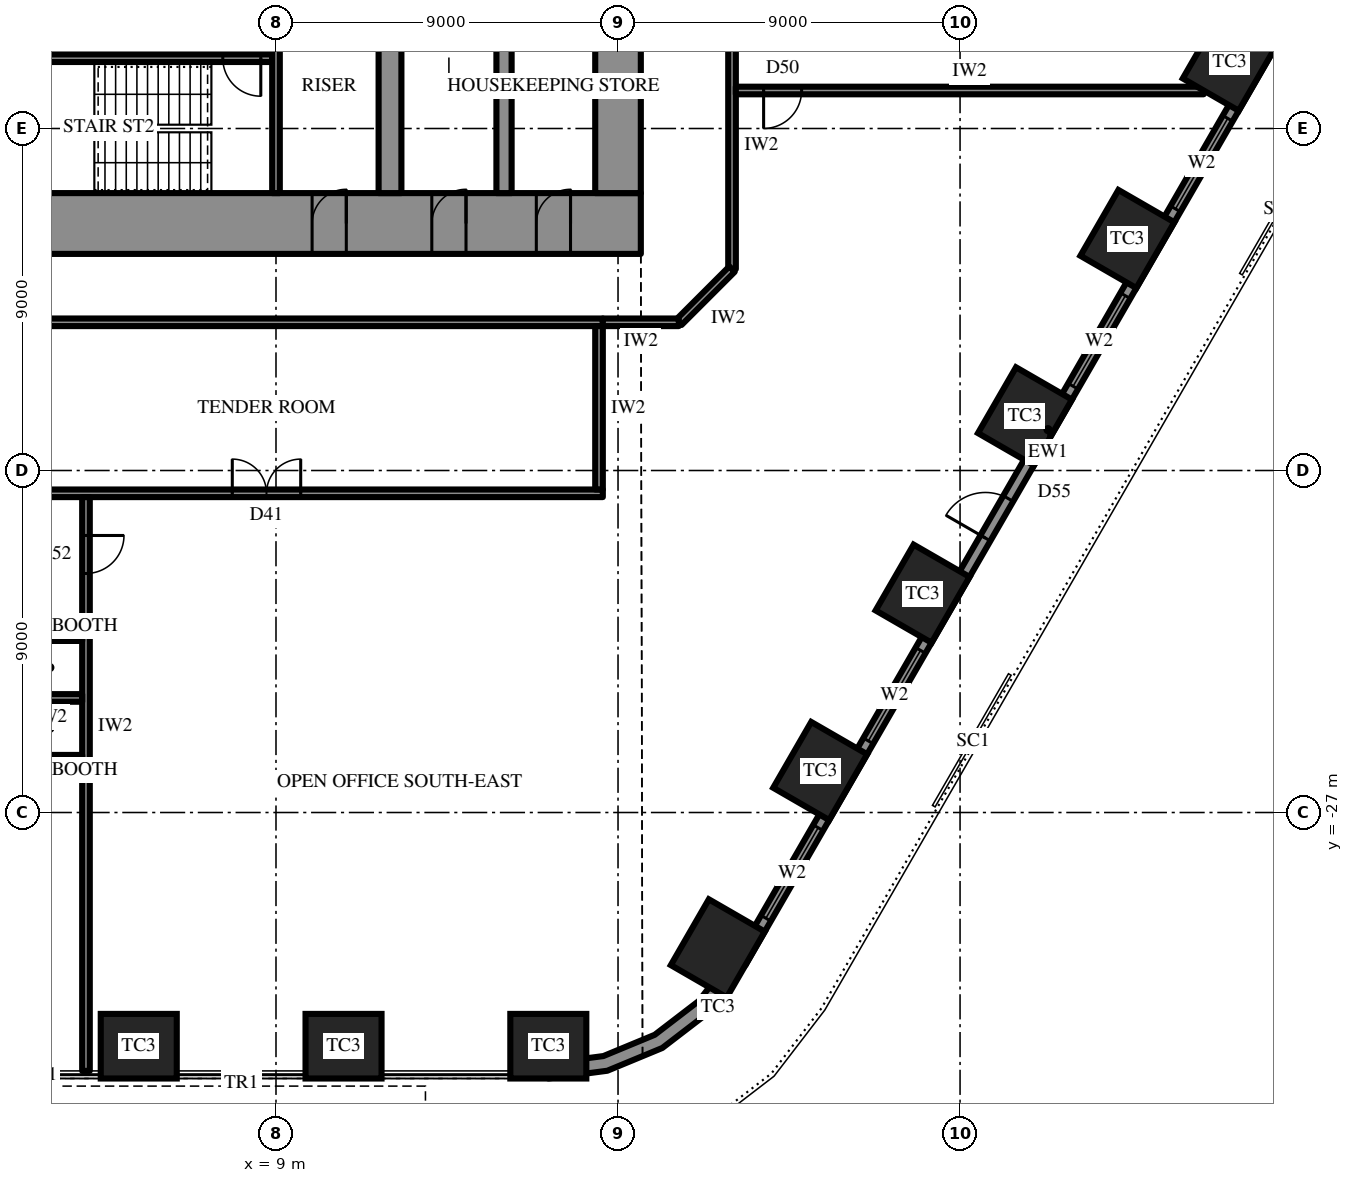
"""IFC4 building model, lengths in metres.
Left out: names, types, materials, properties, quantities, classifications, styles, units other than length and angle.
Written with IfcOpenShell. Run it as: python <this file> out.ifc"""

import sys

from ifc_helpers import new_model, si_unit, direction, frame, frame_2d, origin, origin_2d, place, context, subcontext, project, spatial, polyline, rectangle, outline, extrude, element, fill, save


model = new_model("IFC4")
c1 = context("Model", 3, precision=1e-05, world=origin(), true_north=direction((0.0, 1.0)))
c2 = subcontext(c1, "Body", "Model", "MODEL_VIEW")
j1 = project(units=[si_unit("LENGTHUNIT", "METRE"), si_unit("PLANEANGLEUNIT", "RADIAN")], contexts=[c1])
p1 = place(None, origin())
s1 = spatial("IfcSite", under=j1, at=p1, CompositionType="ELEMENT")
p2 = place(p1, origin())
s2 = spatial("IfcBuilding", under=s1, at=p2, CompositionType="ELEMENT")
p3 = place(p2, frame((0.0, 0.0, 69.7)))
s3 = spatial("IfcBuildingStorey", under=s2, at=p3, CompositionType="ELEMENT", Elevation=69.7)
for number, where, z_axis, x_axis in (
    (1, (5.389, -33.15, 0.0), (0.0, 0.0, 1.0), (1.0, 0.0, 0.0)),
    (2, (10.777, -33.15, 0.0), (0.0, 0.0, 1.0), (1.0, 0.0, 0.0)),
    (3, (16.166, -33.15, 0.0), (0.0, 0.0, 1.0), (1.0, 0.0, 0.0)),
    (4, (20.626, -30.575, 0.0), (0.0, 0.0, 1.0), (0.5, 0.866, 0.0)),
    (5, (23.32, -25.908, 0.0), (0.0, 0.0, 1.0), (0.5, 0.866, 0.0)),
    (6, (26.014, -21.242, 0.0), (0.0, 0.0, 1.0), (0.5, 0.866, 0.0)),
    (7, (28.709, -16.575, 0.0), (0.0, 0.0, 1.0), (0.5, 0.866, 0.0)),
    (8, (31.403, -11.908, 0.0), (0.0, 0.0, 1.0), (0.5, 0.866, 0.0)),
    (9, (34.097, -7.242, 0.0), (0.0, 0.0, 1.0), (0.5, 0.866, 0.0)),
):
    element("IfcColumn", number, at=place(p3, frame(where, z_axis=z_axis, x_axis=x_axis)), inside=s3, PredefinedType="COLUMN", context=c2, shape_type="SweptSolid", body=[
        extrude(rectangle(XDim=2.0, YDim=1.7, at=origin_2d()), origin(), (0.0, 0.0, 1.0), 4.2),
    ])
p4 = place(p3, frame((18.6, -11.5, 0.0), z_axis=(0.0, 0.0, 1.0), x_axis=(-1.0, 0.0, 0.0)))
e10 = element("IfcWall", 10, at=p4, inside=s3, PredefinedType="SHEAR", context=c2, shape_type="SweptSolid", body=[
    extrude(rectangle(XDim=37.2, YDim=1.6, at=frame_2d((18.6, 0.0))), origin(), (0.0, 0.0, 1.0), 4.2),
])
p5 = place(p4, frame((19.45, 0.0, 0.0)))
e11 = element("IfcOpeningElement", 11, at=p5, cuts=e10, PredefinedType="OPENING", context=c2, shape_type="SweptSolid", body=[
    extrude(rectangle(XDim=0.9, YDim=2.2, at=frame_2d((0.45, 1.1))), frame((0.0, 0.81, 0.0), z_axis=(0.0, -1.0, 0.0), x_axis=(1.0, 0.0, 0.0)), (0.0, 0.0, 1.0), 1.62),
])
p6 = place(p4, frame((22.45, 0.0, 0.0)))
e12 = element("IfcOpeningElement", 12, at=p6, cuts=e10, PredefinedType="OPENING", context=c2, shape_type="SweptSolid", body=[
    extrude(rectangle(XDim=0.9, YDim=2.2, at=frame_2d((0.45, 1.1))), frame((0.0, 0.81, 0.0), z_axis=(0.0, -1.0, 0.0), x_axis=(1.0, 0.0, 0.0)), (0.0, 0.0, 1.0), 1.62),
])
p7 = place(p4, frame((25.5, 0.0, 0.0)))
e13 = element("IfcOpeningElement", 13, at=p7, cuts=e10, PredefinedType="OPENING", context=c2, shape_type="SweptSolid", body=[
    extrude(rectangle(XDim=1.0, YDim=2.2, at=frame_2d((0.5, 1.1))), frame((0.0, 0.81, 0.0), z_axis=(0.0, -1.0, 0.0), x_axis=(1.0, 0.0, 0.0)), (0.0, 0.0, 1.0), 1.62),
])
p8 = place(p4, frame((1.85, 0.0, 0.0)))
e14 = element("IfcOpeningElement", 14, at=p8, cuts=e10, PredefinedType="OPENING", context=c2, shape_type="SweptSolid", body=[
    extrude(rectangle(XDim=0.9, YDim=2.2, at=frame_2d((0.45, 1.1))), frame((0.0, 0.81, 0.0), z_axis=(0.0, -1.0, 0.0), x_axis=(1.0, 0.0, 0.0)), (0.0, 0.0, 1.0), 1.62),
])
p9 = place(p4, frame((4.6, 0.0, 0.0)))
e15 = element("IfcOpeningElement", 15, at=p9, cuts=e10, PredefinedType="OPENING", context=c2, shape_type="SweptSolid", body=[
    extrude(rectangle(XDim=0.9, YDim=2.2, at=frame_2d((0.45, 1.1))), frame((0.0, 0.81, 0.0), z_axis=(0.0, -1.0, 0.0), x_axis=(1.0, 0.0, 0.0)), (0.0, 0.0, 1.0), 1.62),
])
p10 = place(p4, frame((7.75, 0.0, 0.0)))
e16 = element("IfcOpeningElement", 16, at=p10, cuts=e10, PredefinedType="OPENING", context=c2, shape_type="SweptSolid", body=[
    extrude(rectangle(XDim=0.9, YDim=2.2, at=frame_2d((0.45, 1.1))), frame((0.0, 0.81, 0.0), z_axis=(0.0, -1.0, 0.0), x_axis=(1.0, 0.0, 0.0)), (0.0, 0.0, 1.0), 1.62),
])
p11 = place(p4, frame((28.55, 0.0, 0.0)))
e17 = element("IfcOpeningElement", 17, at=p11, cuts=e10, PredefinedType="OPENING", context=c2, shape_type="SweptSolid", body=[
    extrude(rectangle(XDim=0.9, YDim=2.2, at=frame_2d((0.45, 1.1))), frame((0.0, 0.81, 0.0), z_axis=(0.0, -1.0, 0.0), x_axis=(1.0, 0.0, 0.0)), (0.0, 0.0, 1.0), 1.62),
])
p12 = place(p4, frame((31.7, 0.0, 0.0)))
e18 = element("IfcOpeningElement", 18, at=p12, cuts=e10, PredefinedType="OPENING", context=c2, shape_type="SweptSolid", body=[
    extrude(rectangle(XDim=0.9, YDim=2.2, at=frame_2d((0.45, 1.1))), frame((0.0, 0.81, 0.0), z_axis=(0.0, -1.0, 0.0), x_axis=(1.0, 0.0, 0.0)), (0.0, 0.0, 1.0), 1.62),
])
p13 = place(p4, frame((34.45, 0.0, 0.0)))
e19 = element("IfcOpeningElement", 19, at=p13, cuts=e10, PredefinedType="OPENING", context=c2, shape_type="SweptSolid", body=[
    extrude(rectangle(XDim=0.9, YDim=2.2, at=frame_2d((0.45, 1.1))), frame((0.0, 0.81, 0.0), z_axis=(0.0, -1.0, 0.0), x_axis=(1.0, 0.0, 0.0)), (0.0, 0.0, 1.0), 1.62),
])
p14 = place(p3, frame((18.0, -10.7, 0.0), z_axis=(0.0, 0.0, 1.0), x_axis=(0.0, 1.0, 0.0)))
e20 = element("IfcWall", 20, at=p14, inside=s3, PredefinedType="SHEAR", context=c2, shape_type="SweptSolid", body=[
    extrude(rectangle(XDim=21.4, YDim=1.2, at=frame_2d((10.7, 0.0))), origin(), (0.0, 0.0, 1.0), 4.2),
])
p15 = place(p14, frame((9.8, 0.0, 0.0)))
e21 = element("IfcOpeningElement", 21, at=p15, cuts=e20, PredefinedType="OPENING", context=c2, shape_type="SweptSolid", body=[
    extrude(rectangle(XDim=1.8, YDim=2.4, at=frame_2d((0.9, 1.2))), frame((0.0, 0.61, 0.0), z_axis=(0.0, -1.0, 0.0), x_axis=(1.0, 0.0, 0.0)), (0.0, 0.0, 1.0), 1.22),
])
p16 = place(p3, frame((12.0, -10.7, 0.0), z_axis=(0.0, 0.0, 1.0), x_axis=(0.0, 1.0, 0.0)))
e22 = element("IfcWall", 22, at=p16, inside=s3, PredefinedType="SHEAR", context=c2, shape_type="SweptSolid", body=[
    extrude(rectangle(XDim=21.4, YDim=0.6, at=frame_2d((10.7, 0.0))), origin(), (0.0, 0.0, 1.0), 4.2),
])
p17 = place(p16, frame((9.8, 0.0, 0.0)))
e23 = element("IfcOpeningElement", 23, at=p17, cuts=e22, PredefinedType="OPENING", context=c2, shape_type="SweptSolid", body=[
    extrude(rectangle(XDim=1.8, YDim=2.4, at=frame_2d((0.9, 1.2))), frame((0.0, 0.31, 0.0), z_axis=(0.0, -1.0, 0.0), x_axis=(1.0, 0.0, 0.0)), (0.0, 0.0, 1.0), 0.62),
])
p18 = place(p3, frame((15.0, -10.7, 0.0), z_axis=(0.0, 0.0, 1.0), x_axis=(0.0, 1.0, 0.0)))
e24 = element("IfcWall", 24, at=p18, inside=s3, PredefinedType="SHEAR", context=c2, shape_type="SweptSolid", body=[
    extrude(rectangle(XDim=21.4, YDim=0.4, at=frame_2d((10.7, 0.0))), origin(), (0.0, 0.0, 1.0), 4.2),
])
p19 = place(p18, frame((9.8, 0.0, 0.0)))
e25 = element("IfcOpeningElement", 25, at=p19, cuts=e24, PredefinedType="OPENING", context=c2, shape_type="SweptSolid", body=[
    extrude(rectangle(XDim=1.8, YDim=2.4, at=frame_2d((0.9, 1.2))), frame((0.0, 0.21, 0.0), z_axis=(0.0, -1.0, 0.0), x_axis=(1.0, 0.0, 0.0)), (0.0, 0.0, 1.0), 0.42),
])
p20 = place(p3, frame((8.9, -7.15, 0.0), z_axis=(0.0, 0.0, 1.0), x_axis=(-1.0, 0.0, 0.0)))
e26 = element("IfcWall", 26, at=p20, inside=s3, PredefinedType="SHEAR", context=c2, shape_type="SweptSolid", body=[
    extrude(rectangle(XDim=8.6, YDim=0.2, at=frame_2d((4.3, 0.0))), origin(), (0.0, 0.0, 1.0), 4.2),
])
p21 = place(p20, frame((0.3, 0.0, 0.0)))
e27 = element("IfcOpeningElement", 27, at=p21, cuts=e26, PredefinedType="OPENING", context=c2, shape_type="SweptSolid", body=[
    extrude(rectangle(XDim=1.0, YDim=2.2, at=frame_2d((0.5, 1.1))), frame((0.0, 0.11, 0.0), z_axis=(0.0, -1.0, 0.0), x_axis=(1.0, 0.0, 0.0)), (0.0, 0.0, 1.0), 0.22),
])
p22 = place(p3, origin())
e28 = element("IfcWall", 28, at=p22, inside=s3, PredefinedType="SOLIDWALL", context=c2, shape_type="SweptSolid", body=[
    extrude(outline(polyline([(16.166, -34.0), (17.719, -33.796), (19.166, -33.196), (20.408, -32.243), (21.362, -31.0), (21.016, -30.8), (20.125, -31.96), (18.966, -32.85), (17.615, -33.409), (16.166, -33.6), (16.166, -34.0)])), origin(), (0.0, 0.0, 1.0), 2.7),
])
p23 = place(p3, frame((21.232, -30.925, 0.0), z_axis=(0.0, 0.0, 1.0), x_axis=(0.499999163675, 0.866025886636, 0.0)))
e29 = element("IfcWall", 29, at=p23, inside=s3, PredefinedType="SOLIDWALL", context=c2, shape_type="SweptSolid", body=[
    extrude(rectangle(XDim=32.332, YDim=0.3, at=frame_2d((16.166, 0.0))), origin(), (0.0, 0.0, 1.0), 2.7),
])
p24 = place(p23, frame((1.319, 0.0, 0.6)))
e30 = element("IfcOpeningElement", 30, at=p24, cuts=e29, PredefinedType="OPENING", context=c2, shape_type="SweptSolid", body=[
    extrude(rectangle(XDim=2.75, YDim=1.85, at=frame_2d((1.375, 0.925))), frame((0.0, 0.16, 0.0), z_axis=(0.0, -1.0, 0.0), x_axis=(1.0, 0.0, 0.0)), (0.0, 0.0, 1.0), 0.32),
])
p25 = place(p23, frame((6.708, 0.0, 0.6)))
e31 = element("IfcOpeningElement", 31, at=p25, cuts=e29, PredefinedType="OPENING", context=c2, shape_type="SweptSolid", body=[
    extrude(rectangle(XDim=2.75, YDim=1.85, at=frame_2d((1.375, 0.925))), frame((0.0, 0.16, 0.0), z_axis=(0.0, -1.0, 0.0), x_axis=(1.0, 0.0, 0.0)), (0.0, 0.0, 1.0), 0.32),
])
p26 = place(p23, frame((12.872, 0.0, 0.0)))
e32 = element("IfcOpeningElement", 32, at=p26, cuts=e29, PredefinedType="OPENING", context=c2, shape_type="SweptSolid", body=[
    extrude(rectangle(XDim=1.2, YDim=2.4, at=frame_2d((0.6, 1.2))), frame((0.0, 0.16, 0.0), z_axis=(0.0, -1.0, 0.0), x_axis=(1.0, 0.0, 0.0)), (0.0, 0.0, 1.0), 0.32),
])
p27 = place(p23, frame((17.485, 0.0, 0.6)))
e33 = element("IfcOpeningElement", 33, at=p27, cuts=e29, PredefinedType="OPENING", context=c2, shape_type="SweptSolid", body=[
    extrude(rectangle(XDim=2.75, YDim=1.85, at=frame_2d((1.375, 0.925))), frame((0.0, 0.16, 0.0), z_axis=(0.0, -1.0, 0.0), x_axis=(1.0, 0.0, 0.0)), (0.0, 0.0, 1.0), 0.32),
])
p28 = place(p23, frame((22.874, 0.0, 0.6)))
e34 = element("IfcOpeningElement", 34, at=p28, cuts=e29, PredefinedType="OPENING", context=c2, shape_type="SweptSolid", body=[
    extrude(rectangle(XDim=2.75, YDim=1.85, at=frame_2d((1.375, 0.925))), frame((0.0, 0.16, 0.0), z_axis=(0.0, -1.0, 0.0), x_axis=(1.0, 0.0, 0.0)), (0.0, 0.0, 1.0), 0.32),
])
p29 = place(p23, frame((28.262, 0.0, 0.6)))
e35 = element("IfcOpeningElement", 35, at=p29, cuts=e29, PredefinedType="OPENING", context=c2, shape_type="SweptSolid", body=[
    extrude(rectangle(XDim=2.75, YDim=1.85, at=frame_2d((1.375, 0.925))), frame((0.0, 0.16, 0.0), z_axis=(0.0, -1.0, 0.0), x_axis=(1.0, 0.0, 0.0)), (0.0, 0.0, 1.0), 0.32),
])
p30 = place(p3, frame((9.0, -5.05, 0.0), z_axis=(0.0, 0.0, 1.0), x_axis=(0.0, -1.0, 0.0)))
e36 = element("IfcWall", 36, at=p30, inside=s3, PredefinedType="PARTITIONING", context=c2, shape_type="SweptSolid", body=[
    extrude(rectangle(XDim=5.65, YDim=0.2, at=frame_2d((2.825, 0.0))), origin(), (0.0, 0.0, 1.0), 4.0),
])
p31 = place(p3, frame((17.6, -14.1, 0.0), z_axis=(0.0, 0.0, 1.0), x_axis=(-1.0, 0.0, 0.0)))
e37 = element("IfcWall", 37, at=p31, inside=s3, PredefinedType="PARTITIONING", context=c2, shape_type="SweptSolid", body=[
    extrude(rectangle(XDim=35.2, YDim=0.2, at=frame_2d((17.6, 0.0))), origin(), (0.0, 0.0, 1.0), 4.0),
])
p32 = place(p3, frame((17.6, -18.6, 0.0), z_axis=(0.0, 0.0, 1.0), x_axis=(-1.0, 0.0, 0.0)))
e38 = element("IfcWall", 38, at=p32, inside=s3, PredefinedType="PARTITIONING", context=c2, shape_type="SweptSolid", body=[
    extrude(rectangle(XDim=35.2, YDim=0.2, at=frame_2d((17.6, 0.0))), origin(), (0.0, 0.0, 1.0), 4.0),
])
p33 = place(p32, frame((7.95, 0.0, 0.0)))
e39 = element("IfcOpeningElement", 39, at=p33, cuts=e38, PredefinedType="OPENING", context=c2, shape_type="SweptSolid", body=[
    extrude(rectangle(XDim=1.8, YDim=2.4, at=frame_2d((0.9, 1.2))), frame((0.0, 0.11, 0.0), z_axis=(0.0, -1.0, 0.0), x_axis=(1.0, 0.0, 0.0)), (0.0, 0.0, 1.0), 0.22),
])
p34 = place(p32, frame((25.45, 0.0, 0.0)))
e40 = element("IfcOpeningElement", 40, at=p34, cuts=e38, PredefinedType="OPENING", context=c2, shape_type="SweptSolid", body=[
    extrude(rectangle(XDim=1.8, YDim=2.4, at=frame_2d((0.9, 1.2))), frame((0.0, 0.11, 0.0), z_axis=(0.0, -1.0, 0.0), x_axis=(1.0, 0.0, 0.0)), (0.0, 0.0, 1.0), 0.22),
])
p35 = place(p3, frame((17.5, -14.2, 0.0), z_axis=(0.0, 0.0, 1.0), x_axis=(0.0, -1.0, 0.0)))
e41 = element("IfcWall", 41, at=p35, inside=s3, PredefinedType="PARTITIONING", context=c2, shape_type="SweptSolid", body=[
    extrude(rectangle(XDim=4.3, YDim=0.2, at=frame_2d((2.15, 0.0))), origin(), (0.0, 0.0, 1.0), 4.0),
])
p36 = place(p3, frame((21.0, -6.201, 0.0), z_axis=(0.0, 0.0, 1.0), x_axis=(0.0, -1.0, 0.0)))
e42 = element("IfcWall", 42, at=p36, inside=s3, PredefinedType="PARTITIONING", context=c2, shape_type="SweptSolid", body=[
    extrude(rectangle(XDim=6.499, YDim=0.2, at=frame_2d((3.25, 0.0))), origin(), (0.0, 0.0, 1.0), 4.0),
])
p37 = place(p3, frame((21.0, -12.7, 0.0), z_axis=(0.0, 0.0, 1.0), x_axis=(-0.707045124756, -0.707168432242, 0.0)))
e43 = element("IfcWall", 43, at=p37, inside=s3, PredefinedType="PARTITIONING", context=c2, shape_type="SweptSolid", body=[
    extrude(rectangle(XDim=1.98, YDim=0.2, at=frame_2d((0.99, 0.0))), origin(), (0.0, 0.0, 1.0), 4.0),
])
p38 = place(p3, frame((19.6, -14.1, 0.0), z_axis=(0.0, 0.0, 1.0), x_axis=(-1.0, 0.0, 0.0)))
e44 = element("IfcWall", 44, at=p38, inside=s3, PredefinedType="PARTITIONING", context=c2, shape_type="SweptSolid", body=[
    extrude(rectangle(XDim=2.0, YDim=0.2, at=frame_2d((1.0, 0.0))), origin(), (0.0, 0.0, 1.0), 4.0),
])
p39 = place(p3, frame((4.0, -18.7, 0.0), z_axis=(0.0, 0.0, 1.0), x_axis=(0.0, -1.0, 0.0)))
e45 = element("IfcWall", 45, at=p39, inside=s3, PredefinedType="PARTITIONING", context=c2, shape_type="SweptSolid", body=[
    extrude(rectangle(XDim=15.1, YDim=0.2, at=frame_2d((7.55, 0.0))), origin(), (0.0, 0.0, 1.0), 4.0),
])
p40 = place(p39, frame((1.01, 0.0, 0.0)))
e46 = element("IfcOpeningElement", 46, at=p40, cuts=e45, PredefinedType="OPENING", context=c2, shape_type="SweptSolid", body=[
    extrude(rectangle(XDim=1.0, YDim=2.2, at=frame_2d((0.5, 1.1))), frame((0.0, 0.11, 0.0), z_axis=(0.0, -1.0, 0.0), x_axis=(1.0, 0.0, 0.0)), (0.0, 0.0, 1.0), 0.22),
])
p41 = place(p3, frame((21.1, -8.0, 0.0), z_axis=(0.0, 0.0, 1.0), x_axis=(1.0, 0.0, 0.0)))
e47 = element("IfcWall", 47, at=p41, inside=s3, PredefinedType="PARTITIONING", context=c2, shape_type="SweptSolid", body=[
    extrude(rectangle(XDim=12.311, YDim=0.2, at=frame_2d((6.155, 0.0))), origin(), (0.0, 0.0, 1.0), 4.0),
])
p42 = place(p41, frame((0.731, 0.0, 0.0)))
e48 = element("IfcOpeningElement", 48, at=p42, cuts=e47, PredefinedType="OPENING", context=c2, shape_type="SweptSolid", body=[
    extrude(rectangle(XDim=1.0, YDim=2.2, at=frame_2d((0.5, 1.1))), frame((0.0, 0.11, 0.0), z_axis=(0.0, -1.0, 0.0), x_axis=(1.0, 0.0, 0.0)), (0.0, 0.0, 1.0), 0.22),
])
for number, where, z_axis, x_axis in (
    (49, (3.9, -22.385, 0.0), (0.0, 0.0, 1.0), (-1.0, 0.0, 0.0)),
    (50, (3.9, -23.985, 0.0), (0.0, 0.0, 1.0), (-1.0, 0.0, 0.0)),
    (51, (3.9, -25.585, 0.0), (0.0, 0.0, 1.0), (-1.0, 0.0, 0.0)),
):
    element("IfcWall", number, at=place(p3, frame(where, z_axis=z_axis, x_axis=x_axis)), inside=s3, PredefinedType="PARTITIONING", context=c2, shape_type="SweptSolid", body=[
        extrude(rectangle(XDim=1.7, YDim=0.2, at=frame_2d((0.85, 0.0))), origin(), (0.0, 0.0, 1.0), 4.0),
    ])
p43 = place(p24, origin())
e52 = element("IfcWindow", 52, at=p43, inside=s3, PartitioningType="SINGLE_PANEL", PredefinedType="WINDOW", context=c2, shape_type="SweptSolid", body=[
    extrude(rectangle(XDim=2.75, YDim=1.85, at=frame_2d((1.375, 0.925))), frame((0.0, 0.03, 0.0), z_axis=(0.0, -1.0, 0.0), x_axis=(1.0, 0.0, 0.0)), (0.0, 0.0, 1.0), 0.06),
])
fill(e30, e52)
p44 = place(p25, origin())
e53 = element("IfcWindow", 53, at=p44, inside=s3, PartitioningType="SINGLE_PANEL", PredefinedType="WINDOW", context=c2, shape_type="SweptSolid", body=[
    extrude(rectangle(XDim=2.75, YDim=1.85, at=frame_2d((1.375, 0.925))), frame((0.0, 0.03, 0.0), z_axis=(0.0, -1.0, 0.0), x_axis=(1.0, 0.0, 0.0)), (0.0, 0.0, 1.0), 0.06),
])
fill(e31, e53)
p45 = place(p26, origin())
e54 = element("IfcDoor", 54, at=p45, inside=s3, OperationType="SINGLE_SWING_RIGHT", PredefinedType="DOOR", context=c2, shape_type="SweptSolid", body=[
    extrude(rectangle(XDim=1.2, YDim=2.4, at=frame_2d((0.6, 1.2))), frame((0.0, 0.025, 0.0), z_axis=(0.0, -1.0, 0.0), x_axis=(1.0, 0.0, 0.0)), (0.0, 0.0, 1.0), 0.05),
])
fill(e32, e54)
p46 = place(p27, origin())
e55 = element("IfcWindow", 55, at=p46, inside=s3, PartitioningType="SINGLE_PANEL", PredefinedType="WINDOW", context=c2, shape_type="SweptSolid", body=[
    extrude(rectangle(XDim=2.75, YDim=1.85, at=frame_2d((1.375, 0.925))), frame((0.0, 0.03, 0.0), z_axis=(0.0, -1.0, 0.0), x_axis=(1.0, 0.0, 0.0)), (0.0, 0.0, 1.0), 0.06),
])
fill(e33, e55)
p47 = place(p28, origin())
e56 = element("IfcWindow", 56, at=p47, inside=s3, PartitioningType="SINGLE_PANEL", PredefinedType="WINDOW", context=c2, shape_type="SweptSolid", body=[
    extrude(rectangle(XDim=2.75, YDim=1.85, at=frame_2d((1.375, 0.925))), frame((0.0, 0.03, 0.0), z_axis=(0.0, -1.0, 0.0), x_axis=(1.0, 0.0, 0.0)), (0.0, 0.0, 1.0), 0.06),
])
fill(e34, e56)
p48 = place(p21, origin())
e57 = element("IfcDoor", 57, at=p48, inside=s3, OperationType="SINGLE_SWING_RIGHT", PredefinedType="DOOR", context=c2, shape_type="SweptSolid", body=[
    extrude(rectangle(XDim=1.0, YDim=2.2, at=frame_2d((0.5, 1.1))), frame((0.0, 0.025, 0.0), z_axis=(0.0, -1.0, 0.0), x_axis=(1.0, 0.0, 0.0)), (0.0, 0.0, 1.0), 0.05),
])
fill(e27, e57)
p49 = place(p8, frame((0.9, 0.0, 0.0), z_axis=(0.0, 0.0, 1.0), x_axis=(-1.0, 0.0, 0.0)))
e58 = element("IfcDoor", 58, at=p49, inside=s3, OperationType="SINGLE_SWING_LEFT", PredefinedType="DOOR", context=c2, shape_type="SweptSolid", body=[
    extrude(rectangle(XDim=0.9, YDim=2.2, at=frame_2d((0.45, 1.1))), frame((0.0, 0.025, 0.0), z_axis=(0.0, -1.0, 0.0), x_axis=(1.0, 0.0, 0.0)), (0.0, 0.0, 1.0), 0.05),
])
fill(e14, e58)
p50 = place(p9, frame((0.9, 0.0, 0.0), z_axis=(0.0, 0.0, 1.0), x_axis=(-1.0, 0.0, 0.0)))
e59 = element("IfcDoor", 59, at=p50, inside=s3, OperationType="SINGLE_SWING_LEFT", PredefinedType="DOOR", context=c2, shape_type="SweptSolid", body=[
    extrude(rectangle(XDim=0.9, YDim=2.2, at=frame_2d((0.45, 1.1))), frame((0.0, 0.025, 0.0), z_axis=(0.0, -1.0, 0.0), x_axis=(1.0, 0.0, 0.0)), (0.0, 0.0, 1.0), 0.05),
])
fill(e15, e59)
p51 = place(p10, frame((0.9, 0.0, 0.0), z_axis=(0.0, 0.0, 1.0), x_axis=(-1.0, 0.0, 0.0)))
e60 = element("IfcDoor", 60, at=p51, inside=s3, OperationType="SINGLE_SWING_LEFT", PredefinedType="DOOR", context=c2, shape_type="SweptSolid", body=[
    extrude(rectangle(XDim=0.9, YDim=2.2, at=frame_2d((0.45, 1.1))), frame((0.0, 0.025, 0.0), z_axis=(0.0, -1.0, 0.0), x_axis=(1.0, 0.0, 0.0)), (0.0, 0.0, 1.0), 0.05),
])
fill(e16, e60)
p52 = place(p33, frame((1.8, 0.0, 0.0), z_axis=(0.0, 0.0, 1.0), x_axis=(-1.0, 0.0, 0.0)))
e61 = element("IfcDoor", 61, at=p52, inside=s3, OperationType="DOUBLE_DOOR_SINGLE_SWING", PredefinedType="DOOR", context=c2, shape_type="SweptSolid", body=[
    extrude(rectangle(XDim=1.8, YDim=2.4, at=frame_2d((0.9, 1.2))), frame((0.0, 0.025, 0.0), z_axis=(0.0, -1.0, 0.0), x_axis=(1.0, 0.0, 0.0)), (0.0, 0.0, 1.0), 0.05),
])
fill(e39, e61)
p53 = place(p40, origin())
e62 = element("IfcDoor", 62, at=p53, inside=s3, OperationType="SINGLE_SWING_RIGHT", PredefinedType="DOOR", context=c2, shape_type="SweptSolid", body=[
    extrude(rectangle(XDim=1.0, YDim=2.2, at=frame_2d((0.5, 1.1))), frame((0.0, 0.025, 0.0), z_axis=(0.0, -1.0, 0.0), x_axis=(1.0, 0.0, 0.0)), (0.0, 0.0, 1.0), 0.05),
])
fill(e46, e62)
p54 = place(p42, frame((1.0, 0.0, 0.0), z_axis=(0.0, 0.0, 1.0), x_axis=(-1.0, 0.0, 0.0)))
e63 = element("IfcDoor", 63, at=p54, inside=s3, OperationType="SINGLE_SWING_LEFT", PredefinedType="DOOR", context=c2, shape_type="SweptSolid", body=[
    extrude(rectangle(XDim=1.0, YDim=2.2, at=frame_2d((0.5, 1.1))), frame((0.0, 0.025, 0.0), z_axis=(0.0, -1.0, 0.0), x_axis=(1.0, 0.0, 0.0)), (0.0, 0.0, 1.0), 0.05),
])
fill(e48, e63)
save(model, sys.argv[1])
